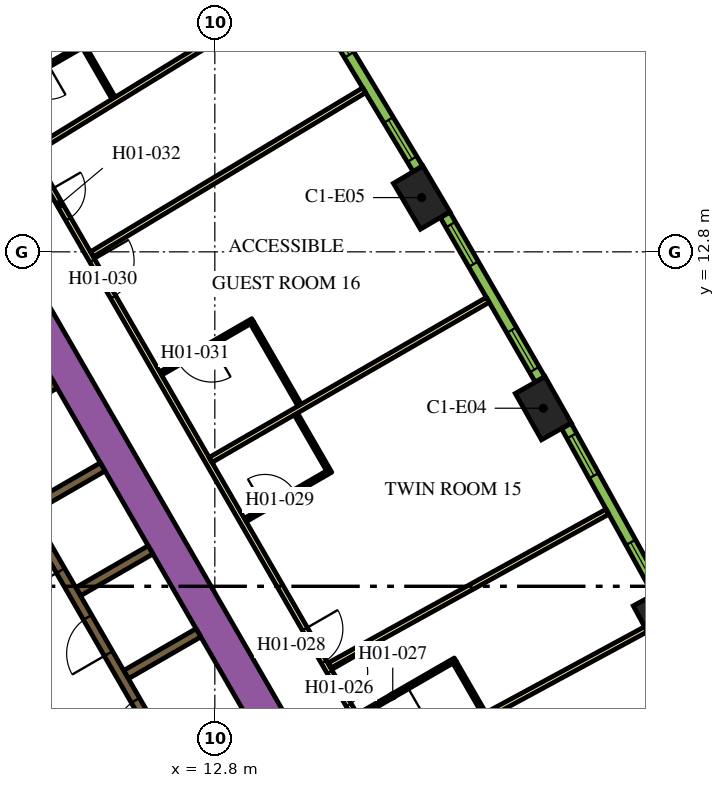
"""IFC4 building model, lengths in metres.
Left out: names, types, materials, properties, quantities, classifications, styles, units other than length and angle.
Written with IfcOpenShell. Run it as: python <this file> out.ifc"""

import sys

from ifc_helpers import new_model, si_unit, direction, frame, frame_2d, origin, origin_2d, place, context, subcontext, project, spatial, rectangle, extrude, element, fill, save


model = new_model("IFC4")
c1 = context("Model", 3, precision=1e-05, world=origin(), true_north=direction((0.0, 1.0)))
c2 = subcontext(c1, "Body", "Model", "MODEL_VIEW")
j1 = project(units=[si_unit("LENGTHUNIT", "METRE"), si_unit("PLANEANGLEUNIT", "RADIAN")], contexts=[c1])
p1 = place(None, origin())
s1 = spatial("IfcSite", under=j1, at=p1, CompositionType="ELEMENT")
p2 = place(p1, origin())
s2 = spatial("IfcBuilding", under=s1, at=p2, CompositionType="ELEMENT")
p3 = place(p2, frame((0.0, 0.0, 35.4)))
s3 = spatial("IfcBuildingStorey", under=s2, at=p3, CompositionType="ELEMENT", Elevation=35.4)
for number, where, z_axis, x_axis in (
    (1, (24.54, 3.085, 0.0), (0.0, 0.0, 1.0), (-0.476, 0.88, 0.0)),
    (2, (21.443, 8.685, 0.0), (0.0, 0.0, 1.0), (-0.492, 0.871, 0.0)),
    (3, (18.243, 14.228, 0.0), (0.0, 0.0, 1.0), (-0.508, 0.861, 0.0)),
):
    element("IfcColumn", number, at=place(p3, frame(where, z_axis=z_axis, x_axis=x_axis)), inside=s3, PredefinedType="COLUMN", context=c2, shape_type="SweptSolid", body=[
        extrude(rectangle(XDim=1.4, YDim=0.9, at=origin_2d()), origin(), (0.0, 0.0, 1.0), 3.9),
    ])
p4 = place(p3, frame((6.711, 13.476, 0.0), z_axis=(0.0, 0.0, 1.0), x_axis=(0.500002723396, -0.866023831425, 0.0)))
e4 = element("IfcWall", 4, at=p4, inside=s3, PredefinedType="SOLIDWALL", context=c2, shape_type="SweptSolid", body=[
    extrude(rectangle(XDim=20.334, YDim=0.9, at=frame_2d((10.167, 0.0))), origin(), (0.0, 0.0, 1.0), 3.9),
])
for number, where, z_axis, x_axis in (
    (5, (10.464, 1.677, 0.0), (0.0, 0.0, 1.0), (0.866, 0.5, 0.0)),
    (6, (6.684, 8.224, 0.0), (0.0, 0.0, 1.0), (0.866, 0.5, 0.0)),
    (7, (7.944, 6.041, 0.0), (0.0, 0.0, 1.0), (0.866, 0.5, 0.0)),
    (8, (9.204, 3.859, 0.0), (0.0, 0.0, 1.0), (0.866, 0.5, 0.0)),
):
    element("IfcWall", number, at=place(p3, frame(where, z_axis=z_axis, x_axis=x_axis)), inside=s3, PredefinedType="SOLIDWALL", context=c2, shape_type="SweptSolid", body=[
        extrude(rectangle(XDim=2.2, YDim=0.25, at=frame_2d((1.1, 0.0))), origin(), (0.0, 0.0, 1.0), 3.9),
    ])
p5 = place(p3, frame((11.553, -0.46, 0.0), z_axis=(0.0, 0.0, 1.0), x_axis=(-0.500006514828, 0.866021642414, 0.0)))
e9 = element("IfcWall", 9, at=p5, inside=s3, PredefinedType="SOLIDWALL", context=c2, shape_type="SweptSolid", body=[
    extrude(rectangle(XDim=12.35, YDim=0.25, at=frame_2d((6.175, 0.0))), origin(), (0.0, 0.0, 1.0), 3.9),
])
p6 = place(p5, frame((0.585, 0.0, 0.0)))
e10 = element("IfcOpeningElement", 10, at=p6, cuts=e9, PredefinedType="OPENING", context=c2, shape_type="SweptSolid", body=[
    extrude(rectangle(XDim=1.1, YDim=2.1, at=frame_2d((0.55, 1.05))), frame((0.0, 0.135, 0.0), z_axis=(0.0, -1.0, 0.0), x_axis=(1.0, 0.0, 0.0)), (0.0, 0.0, 1.0), 0.27),
])
p7 = place(p5, frame((3.105, 0.0, 0.0)))
e11 = element("IfcOpeningElement", 11, at=p7, cuts=e9, PredefinedType="OPENING", context=c2, shape_type="SweptSolid", body=[
    extrude(rectangle(XDim=1.1, YDim=2.1, at=frame_2d((0.55, 1.05))), frame((0.0, 0.135, 0.0), z_axis=(0.0, -1.0, 0.0), x_axis=(1.0, 0.0, 0.0)), (0.0, 0.0, 1.0), 0.27),
])
p8 = place(p5, frame((5.625, 0.0, 0.0)))
e12 = element("IfcOpeningElement", 12, at=p8, cuts=e9, PredefinedType="OPENING", context=c2, shape_type="SweptSolid", body=[
    extrude(rectangle(XDim=1.1, YDim=2.1, at=frame_2d((0.55, 1.05))), frame((0.0, 0.135, 0.0), z_axis=(0.0, -1.0, 0.0), x_axis=(1.0, 0.0, 0.0)), (0.0, 0.0, 1.0), 0.27),
])
p9 = place(p3, frame((8.565, -2.185, 0.0), z_axis=(0.0, 0.0, 1.0), x_axis=(-0.499997954832, 0.866026584559, 0.0)))
e13 = element("IfcWall", 13, at=p9, inside=s3, PredefinedType="SOLIDWALL", context=c2, shape_type="SweptSolid", body=[
    extrude(rectangle(XDim=12.35, YDim=0.25, at=frame_2d((6.175, 0.0))), origin(), (0.0, 0.0, 1.0), 3.9),
])
p10 = place(p9, frame((5.725, 0.0, 0.0)))
e14 = element("IfcOpeningElement", 14, at=p10, cuts=e13, PredefinedType="OPENING", context=c2, shape_type="SweptSolid", body=[
    extrude(rectangle(XDim=0.9, YDim=2.1, at=frame_2d((0.45, 1.05))), frame((0.0, 0.135, 0.0), z_axis=(0.0, -1.0, 0.0), x_axis=(1.0, 0.0, 0.0)), (0.0, 0.0, 1.0), 0.27),
])
p11 = place(p3, frame((6.163, 18.475, 0.0), z_axis=(0.0, 0.0, 1.0), x_axis=(0.500001317485, -0.866024643133, 0.0)))
e15 = element("IfcWall", 15, at=p11, inside=s3, PredefinedType="PARTITIONING", context=c2, shape_type="SweptSolid", body=[
    extrude(rectangle(XDim=25.767, YDim=0.15, at=frame_2d((12.883, 0.0))), origin(), (0.0, 0.0, 1.0), 2.75),
])
p12 = place(p11, frame((24.586, 0.0, 0.0)))
e16 = element("IfcOpeningElement", 16, at=p12, cuts=e15, PredefinedType="OPENING", context=c2, shape_type="SweptSolid", body=[
    extrude(rectangle(XDim=1.0, YDim=2.1, at=frame_2d((0.5, 1.05))), frame((0.0, 0.085, 0.0), z_axis=(0.0, -1.0, 0.0), x_axis=(1.0, 0.0, 0.0)), (0.0, 0.0, 1.0), 0.17),
])
p13 = place(p11, frame((19.319, 0.0, 0.0)))
e17 = element("IfcOpeningElement", 17, at=p13, cuts=e15, PredefinedType="OPENING", context=c2, shape_type="SweptSolid", body=[
    extrude(rectangle(XDim=1.0, YDim=2.1, at=frame_2d((0.5, 1.05))), frame((0.0, 0.085, 0.0), z_axis=(0.0, -1.0, 0.0), x_axis=(1.0, 0.0, 0.0)), (0.0, 0.0, 1.0), 0.17),
])
p14 = place(p11, frame((18.012, 0.0, 0.0)))
e18 = element("IfcOpeningElement", 18, at=p14, cuts=e15, PredefinedType="OPENING", context=c2, shape_type="SweptSolid", body=[
    extrude(rectangle(XDim=1.0, YDim=2.1, at=frame_2d((0.5, 1.05))), frame((0.0, 0.085, 0.0), z_axis=(0.0, -1.0, 0.0), x_axis=(1.0, 0.0, 0.0)), (0.0, 0.0, 1.0), 0.17),
])
p15 = place(p11, frame((6.824, 0.0, 0.0)))
e19 = element("IfcOpeningElement", 19, at=p15, cuts=e15, PredefinedType="OPENING", context=c2, shape_type="SweptSolid", body=[
    extrude(rectangle(XDim=1.1, YDim=2.1, at=frame_2d((0.55, 1.05))), frame((0.0, 0.085, 0.0), z_axis=(0.0, -1.0, 0.0), x_axis=(1.0, 0.0, 0.0)), (0.0, 0.0, 1.0), 0.17),
])
p16 = place(p11, frame((4.658, 0.0, 0.0)))
e20 = element("IfcOpeningElement", 20, at=p16, cuts=e15, PredefinedType="OPENING", context=c2, shape_type="SweptSolid", body=[
    extrude(rectangle(XDim=0.9, YDim=2.1, at=frame_2d((0.45, 1.05))), frame((0.0, 0.085, 0.0), z_axis=(0.0, -1.0, 0.0), x_axis=(1.0, 0.0, 0.0)), (0.0, 0.0, 1.0), 0.17),
])
p17 = place(p11, frame((0.18, 0.0, 0.0)))
e21 = element("IfcOpeningElement", 21, at=p17, cuts=e15, PredefinedType="OPENING", context=c2, shape_type="SweptSolid", body=[
    extrude(rectangle(XDim=1.0, YDim=2.1, at=frame_2d((0.5, 1.05))), frame((0.0, 0.085, 0.0), z_axis=(0.0, -1.0, 0.0), x_axis=(1.0, 0.0, 0.0)), (0.0, 0.0, 1.0), 0.17),
])
p18 = place(p3, frame((14.558, 19.475, 0.0), z_axis=(0.0, 0.0, 1.0), x_axis=(-0.851829455142, -0.523819223925, 0.0)))
e22 = element("IfcWall", 22, at=p18, inside=s3, PredefinedType="PARTITIONING", context=c2, shape_type="SweptSolid", body=[
    extrude(rectangle(XDim=7.688, YDim=0.15, at=frame_2d((3.844, 0.0))), origin(), (0.0, 0.0, 1.0), 2.75),
])
p19 = place(p3, frame((16.729, 17.052, 0.0), z_axis=(0.0, 0.0, 1.0), x_axis=(-0.856630606266, -0.515930232113, 0.0)))
e23 = element("IfcWall", 23, at=p19, inside=s3, PredefinedType="PARTITIONING", context=c2, shape_type="SweptSolid", body=[
    extrude(rectangle(XDim=8.355, YDim=0.15, at=frame_2d((4.178, 0.0))), origin(), (0.0, 0.0, 1.0), 2.75),
])
p20 = place(p3, frame((19.982, 11.537, 0.0), z_axis=(0.0, 0.0, 1.0), x_axis=(-0.866020994654, -0.500007636761, 0.0)))
e24 = element("IfcWall", 24, at=p20, inside=s3, PredefinedType="PARTITIONING", context=c2, shape_type="SweptSolid", body=[
    extrude(rectangle(XDim=8.423, YDim=0.15, at=frame_2d((4.211, 0.0))), origin(), (0.0, 0.0, 1.0), 2.75),
])
p21 = place(p3, frame((23.132, 5.962, 0.0), z_axis=(0.0, 0.0, 1.0), x_axis=(-0.875121716713, -0.483902863121, 0.0)))
e25 = element("IfcWall", 25, at=p21, inside=s3, PredefinedType="PARTITIONING", context=c2, shape_type="SweptSolid", body=[
    extrude(rectangle(XDim=8.355, YDim=0.15, at=frame_2d((4.178, 0.0))), origin(), (0.0, 0.0, 1.0), 2.75),
])
p22 = place(p3, frame((24.145, 2.871, 0.0), z_axis=(0.0, 0.0, 1.0), x_axis=(-0.879551725039, -0.475803281809, 0.0)))
e26 = element("IfcWall", 26, at=p22, inside=s3, PredefinedType="PARTITIONING", context=c2, shape_type="SweptSolid", body=[
    extrude(rectangle(XDim=7.688, YDim=0.15, at=frame_2d((3.844, 0.0))), origin(), (0.0, 0.0, 1.0), 2.75),
])
p23 = place(p3, frame((19.127, 2.071, 0.0), z_axis=(0.0, 0.0, 1.0), x_axis=(-0.866003658127, -0.500037662692, 0.0)))
e27 = element("IfcWall", 27, at=p23, inside=s3, PredefinedType="PARTITIONING", context=c2, shape_type="SweptSolid", body=[
    extrude(rectangle(XDim=2.95, YDim=0.1, at=frame_2d((1.475, 0.0))), origin(), (0.0, 0.0, 1.0), 2.75),
])
p24 = place(p23, frame((1.45, 0.0, 0.0)))
e28 = element("IfcOpeningElement", 28, at=p24, cuts=e27, PredefinedType="OPENING", context=c2, shape_type="SweptSolid", body=[
    extrude(rectangle(XDim=0.9, YDim=2.1, at=frame_2d((0.45, 1.05))), frame((0.0, 0.06, 0.0), z_axis=(0.0, -1.0, 0.0), x_axis=(1.0, 0.0, 0.0)), (0.0, 0.0, 1.0), 0.12),
])
p25 = place(p3, frame((19.109, 2.002, 0.0), z_axis=(0.0, 0.0, 1.0), x_axis=(0.500086022567, -0.865975732936, 0.0)))
e29 = element("IfcWall", 29, at=p25, inside=s3, PredefinedType="PARTITIONING", context=c2, shape_type="SweptSolid", body=[
    extrude(rectangle(XDim=1.55, YDim=0.1, at=frame_2d((0.775, 0.0))), origin(), (0.0, 0.0, 1.0), 2.75),
])
p26 = place(p3, frame((13.6, 5.744, 0.0), z_axis=(0.0, 0.0, 1.0), x_axis=(0.866021400173, 0.500006934395, 0.0)))
e30 = element("IfcWall", 30, at=p26, inside=s3, PredefinedType="PARTITIONING", context=c2, shape_type="SweptSolid", body=[
    extrude(rectangle(XDim=2.6, YDim=0.1, at=frame_2d((1.3, 0.0))), origin(), (0.0, 0.0, 1.0), 2.75),
])
p27 = place(p26, frame((0.6, 0.0, 0.0)))
e31 = element("IfcOpeningElement", 31, at=p27, cuts=e30, PredefinedType="OPENING", context=c2, shape_type="SweptSolid", body=[
    extrude(rectangle(XDim=0.9, YDim=2.1, at=frame_2d((0.45, 1.05))), frame((0.0, 0.06, 0.0), z_axis=(0.0, -1.0, 0.0), x_axis=(1.0, 0.0, 0.0)), (0.0, 0.0, 1.0), 0.12),
])
p28 = place(p3, frame((15.779, 7.071, 0.0), z_axis=(0.0, 0.0, 1.0), x_axis=(-0.499976720371, 0.866038843867, 0.0)))
e32 = element("IfcWall", 32, at=p28, inside=s3, PredefinedType="PARTITIONING", context=c2, shape_type="SweptSolid", body=[
    extrude(rectangle(XDim=1.69, YDim=0.1, at=frame_2d((0.845, 0.0))), origin(), (0.0, 0.0, 1.0), 2.75),
])
p29 = place(p3, frame((13.799, 10.999, 0.0), z_axis=(0.0, 0.0, 1.0), x_axis=(-0.866034573852, -0.49998411664, 0.0)))
e33 = element("IfcWall", 33, at=p29, inside=s3, PredefinedType="PARTITIONING", context=c2, shape_type="SweptSolid", body=[
    extrude(rectangle(XDim=2.8, YDim=0.1, at=frame_2d((1.4, 0.0))), origin(), (0.0, 0.0, 1.0), 2.75),
])
p30 = place(p29, frame((1.25, 0.0, 0.0)))
e34 = element("IfcOpeningElement", 34, at=p30, cuts=e33, PredefinedType="OPENING", context=c2, shape_type="SweptSolid", body=[
    extrude(rectangle(XDim=1.0, YDim=2.1, at=frame_2d((0.5, 1.05))), frame((0.0, 0.06, 0.0), z_axis=(0.0, -1.0, 0.0), x_axis=(1.0, 0.0, 0.0)), (0.0, 0.0, 1.0), 0.12),
])
p31 = place(p3, frame((13.781, 10.931, 0.0), z_axis=(0.0, 0.0, 1.0), x_axis=(0.500004234368, -0.866022959057, 0.0)))
e35 = element("IfcWall", 35, at=p31, inside=s3, PredefinedType="PARTITIONING", context=c2, shape_type="SweptSolid", body=[
    extrude(rectangle(XDim=2.5, YDim=0.1, at=frame_2d((1.25, 0.0))), origin(), (0.0, 0.0, 1.0), 2.75),
])
p32 = place(p3, frame((9.375, 18.261, 0.0), z_axis=(0.0, 0.0, 1.0), x_axis=(-0.866021400173, -0.500006934395, 0.0)))
e36 = element("IfcWall", 36, at=p32, inside=s3, PredefinedType="PARTITIONING", context=c2, shape_type="SweptSolid", body=[
    extrude(rectangle(XDim=2.6, YDim=0.1, at=frame_2d((1.3, 0.0))), origin(), (0.0, 0.0, 1.0), 2.75),
])
p33 = place(p32, frame((1.1, 0.0, 0.0)))
e37 = element("IfcOpeningElement", 37, at=p33, cuts=e36, PredefinedType="OPENING", context=c2, shape_type="SweptSolid", body=[
    extrude(rectangle(XDim=0.9, YDim=2.1, at=frame_2d((0.45, 1.05))), frame((0.0, 0.06, 0.0), z_axis=(0.0, -1.0, 0.0), x_axis=(1.0, 0.0, 0.0)), (0.0, 0.0, 1.0), 0.12),
])
p34 = place(p3, frame((9.357, 18.193, 0.0), z_axis=(0.0, 0.0, 1.0), x_axis=(0.499899694197, -0.866083307622, 0.0)))
e38 = element("IfcWall", 38, at=p34, inside=s3, PredefinedType="PARTITIONING", context=c2, shape_type="SweptSolid", body=[
    extrude(rectangle(XDim=1.55, YDim=0.1, at=frame_2d((0.775, 0.0))), origin(), (0.0, 0.0, 1.0), 2.75),
])
p35 = place(p3, frame((24.468, 3.846, 0.0), z_axis=(0.0, 0.0, 1.0), x_axis=(-0.483912572871, 0.875116347589, 0.0)))
e39 = element("IfcWall", 39, at=p35, inside=s3, PredefinedType="SOLIDWALL", context=c2, shape_type="SweptSolid", body=[
    extrude(rectangle(XDim=4.998, YDim=0.29, at=frame_2d((2.499, 0.0))), origin(), (0.0, 0.0, 1.0), 3.65),
])
p36 = place(p35, frame((0.297, 0.0, 0.9)))
e40 = element("IfcOpeningElement", 40, at=p36, cuts=e39, PredefinedType="OPENING", context=c2, shape_type="SweptSolid", body=[
    extrude(rectangle(XDim=1.2, YDim=2.15, at=frame_2d((0.6, 1.075))), frame((0.0, 0.155, 0.0), z_axis=(0.0, -1.0, 0.0), x_axis=(1.0, 0.0, 0.0)), (0.0, 0.0, 1.0), 0.31),
])
p37 = place(p35, frame((3.501, 0.0, 0.9)))
e41 = element("IfcOpeningElement", 41, at=p37, cuts=e39, PredefinedType="OPENING", context=c2, shape_type="SweptSolid", body=[
    extrude(rectangle(XDim=1.2, YDim=2.15, at=frame_2d((0.6, 1.075))), frame((0.0, 0.155, 0.0), z_axis=(0.0, -1.0, 0.0), x_axis=(1.0, 0.0, 0.0)), (0.0, 0.0, 1.0), 0.31),
])
p38 = place(p3, frame((21.357, 9.445, 0.0), z_axis=(0.0, 0.0, 1.0), x_axis=(-0.50002123722, 0.866013142123, 0.0)))
e42 = element("IfcWall", 42, at=p38, inside=s3, PredefinedType="SOLIDWALL", context=c2, shape_type="SweptSolid", body=[
    extrude(rectangle(XDim=4.998, YDim=0.29, at=frame_2d((2.499, 0.0))), origin(), (0.0, 0.0, 1.0), 3.65),
])
p39 = place(p38, frame((0.297, 0.0, 0.9)))
e43 = element("IfcOpeningElement", 43, at=p39, cuts=e42, PredefinedType="OPENING", context=c2, shape_type="SweptSolid", body=[
    extrude(rectangle(XDim=1.2, YDim=2.15, at=frame_2d((0.6, 1.075))), frame((0.0, 0.155, 0.0), z_axis=(0.0, -1.0, 0.0), x_axis=(1.0, 0.0, 0.0)), (0.0, 0.0, 1.0), 0.31),
])
p40 = place(p38, frame((3.501, 0.0, 0.9)))
e44 = element("IfcOpeningElement", 44, at=p40, cuts=e42, PredefinedType="OPENING", context=c2, shape_type="SweptSolid", body=[
    extrude(rectangle(XDim=1.2, YDim=2.15, at=frame_2d((0.6, 1.075))), frame((0.0, 0.155, 0.0), z_axis=(0.0, -1.0, 0.0), x_axis=(1.0, 0.0, 0.0)), (0.0, 0.0, 1.0), 0.31),
])
p41 = place(p3, frame((18.143, 14.986, 0.0), z_axis=(0.0, 0.0, 1.0), x_axis=(-0.515938796285, 0.856625448191, 0.0)))
e45 = element("IfcWall", 45, at=p41, inside=s3, PredefinedType="SOLIDWALL", context=c2, shape_type="SweptSolid", body=[
    extrude(rectangle(XDim=4.998, YDim=0.29, at=frame_2d((2.499, 0.0))), origin(), (0.0, 0.0, 1.0), 3.65),
])
p42 = place(p41, frame((0.297, 0.0, 0.9)))
e46 = element("IfcOpeningElement", 46, at=p42, cuts=e45, PredefinedType="OPENING", context=c2, shape_type="SweptSolid", body=[
    extrude(rectangle(XDim=1.2, YDim=2.15, at=frame_2d((0.6, 1.075))), frame((0.0, 0.155, 0.0), z_axis=(0.0, -1.0, 0.0), x_axis=(1.0, 0.0, 0.0)), (0.0, 0.0, 1.0), 0.31),
])
p43 = place(p41, frame((3.501, 0.0, 0.9)))
e47 = element("IfcOpeningElement", 47, at=p43, cuts=e45, PredefinedType="OPENING", context=c2, shape_type="SweptSolid", body=[
    extrude(rectangle(XDim=1.2, YDim=2.15, at=frame_2d((0.6, 1.075))), frame((0.0, 0.155, 0.0), z_axis=(0.0, -1.0, 0.0), x_axis=(1.0, 0.0, 0.0)), (0.0, 0.0, 1.0), 0.31),
])
p44 = place(p6, origin())
e48 = element("IfcDoor", 48, at=p44, inside=s3, OperationType="DOUBLE_DOOR_SLIDING", PredefinedType="DOOR", context=c2, shape_type="SweptSolid", body=[
    extrude(rectangle(XDim=1.1, YDim=2.1, at=frame_2d((0.55, 1.05))), frame((0.0, 0.025, 0.0), z_axis=(0.0, -1.0, 0.0), x_axis=(1.0, 0.0, 0.0)), (0.0, 0.0, 1.0), 0.05),
])
fill(e10, e48)
p45 = place(p7, origin())
e49 = element("IfcDoor", 49, at=p45, inside=s3, OperationType="DOUBLE_DOOR_SLIDING", PredefinedType="DOOR", context=c2, shape_type="SweptSolid", body=[
    extrude(rectangle(XDim=1.1, YDim=2.1, at=frame_2d((0.55, 1.05))), frame((0.0, 0.025, 0.0), z_axis=(0.0, -1.0, 0.0), x_axis=(1.0, 0.0, 0.0)), (0.0, 0.0, 1.0), 0.05),
])
fill(e11, e49)
p46 = place(p8, origin())
e50 = element("IfcDoor", 50, at=p46, inside=s3, OperationType="DOUBLE_DOOR_SLIDING", PredefinedType="DOOR", context=c2, shape_type="SweptSolid", body=[
    extrude(rectangle(XDim=1.1, YDim=2.1, at=frame_2d((0.55, 1.05))), frame((0.0, 0.025, 0.0), z_axis=(0.0, -1.0, 0.0), x_axis=(1.0, 0.0, 0.0)), (0.0, 0.0, 1.0), 0.05),
])
fill(e12, e50)
p47 = place(p13, origin())
e51 = element("IfcDoor", 51, at=p47, inside=s3, OperationType="SINGLE_SWING_LEFT", PredefinedType="DOOR", context=c2, shape_type="SweptSolid", body=[
    extrude(rectangle(XDim=1.0, YDim=2.1, at=frame_2d((0.5, 1.05))), frame((0.0, 0.025, 0.0), z_axis=(0.0, -1.0, 0.0), x_axis=(1.0, 0.0, 0.0)), (0.0, 0.0, 1.0), 0.05),
])
fill(e17, e51)
p48 = place(p24, origin())
e52 = element("IfcDoor", 52, at=p48, inside=s3, OperationType="SINGLE_SWING_LEFT", PredefinedType="DOOR", context=c2, shape_type="SweptSolid", body=[
    extrude(rectangle(XDim=0.9, YDim=2.1, at=frame_2d((0.45, 1.05))), frame((0.0, 0.025, 0.0), z_axis=(0.0, -1.0, 0.0), x_axis=(1.0, 0.0, 0.0)), (0.0, 0.0, 1.0), 0.05),
])
fill(e28, e52)
p49 = place(p14, origin())
e53 = element("IfcDoor", 53, at=p49, inside=s3, OperationType="SINGLE_SWING_RIGHT", PredefinedType="DOOR", context=c2, shape_type="SweptSolid", body=[
    extrude(rectangle(XDim=1.0, YDim=2.1, at=frame_2d((0.5, 1.05))), frame((0.0, 0.025, 0.0), z_axis=(0.0, -1.0, 0.0), x_axis=(1.0, 0.0, 0.0)), (0.0, 0.0, 1.0), 0.05),
])
fill(e18, e53)
p50 = place(p27, origin())
e54 = element("IfcDoor", 54, at=p50, inside=s3, OperationType="SINGLE_SWING_RIGHT", PredefinedType="DOOR", context=c2, shape_type="SweptSolid", body=[
    extrude(rectangle(XDim=0.9, YDim=2.1, at=frame_2d((0.45, 1.05))), frame((0.0, 0.025, 0.0), z_axis=(0.0, -1.0, 0.0), x_axis=(1.0, 0.0, 0.0)), (0.0, 0.0, 1.0), 0.05),
])
fill(e31, e54)
p51 = place(p15, origin())
e55 = element("IfcDoor", 55, at=p51, inside=s3, OperationType="SINGLE_SWING_LEFT", PredefinedType="DOOR", context=c2, shape_type="SweptSolid", body=[
    extrude(rectangle(XDim=1.1, YDim=2.1, at=frame_2d((0.55, 1.05))), frame((0.0, 0.025, 0.0), z_axis=(0.0, -1.0, 0.0), x_axis=(1.0, 0.0, 0.0)), (0.0, 0.0, 1.0), 0.05),
])
fill(e19, e55)
p52 = place(p30, origin())
e56 = element("IfcDoor", 56, at=p52, inside=s3, OperationType="SINGLE_SWING_LEFT", PredefinedType="DOOR", context=c2, shape_type="SweptSolid", body=[
    extrude(rectangle(XDim=1.0, YDim=2.1, at=frame_2d((0.5, 1.05))), frame((0.0, 0.025, 0.0), z_axis=(0.0, -1.0, 0.0), x_axis=(1.0, 0.0, 0.0)), (0.0, 0.0, 1.0), 0.05),
])
fill(e34, e56)
p53 = place(p16, origin())
e57 = element("IfcDoor", 57, at=p53, inside=s3, OperationType="SINGLE_SWING_LEFT", PredefinedType="DOOR", context=c2, shape_type="SweptSolid", body=[
    extrude(rectangle(XDim=0.9, YDim=2.1, at=frame_2d((0.45, 1.05))), frame((0.0, 0.025, 0.0), z_axis=(0.0, -1.0, 0.0), x_axis=(1.0, 0.0, 0.0)), (0.0, 0.0, 1.0), 0.05),
])
fill(e20, e57)
p54 = place(p36, origin())
e58 = element("IfcWindow", 58, at=p54, inside=s3, PartitioningType="DOUBLE_PANEL_VERTICAL", PredefinedType="WINDOW", context=c2, shape_type="SweptSolid", body=[
    extrude(rectangle(XDim=1.2, YDim=2.15, at=frame_2d((0.6, 1.075))), frame((0.0, 0.015, 0.0), z_axis=(0.0, -1.0, 0.0), x_axis=(1.0, 0.0, 0.0)), (0.0, 0.0, 1.0), 0.06),
])
fill(e40, e58)
p55 = place(p37, origin())
e59 = element("IfcWindow", 59, at=p55, inside=s3, PartitioningType="DOUBLE_PANEL_VERTICAL", PredefinedType="WINDOW", context=c2, shape_type="SweptSolid", body=[
    extrude(rectangle(XDim=1.2, YDim=2.15, at=frame_2d((0.6, 1.075))), frame((0.0, 0.015, 0.0), z_axis=(0.0, -1.0, 0.0), x_axis=(1.0, 0.0, 0.0)), (0.0, 0.0, 1.0), 0.06),
])
fill(e41, e59)
p56 = place(p39, origin())
e60 = element("IfcWindow", 60, at=p56, inside=s3, PartitioningType="DOUBLE_PANEL_VERTICAL", PredefinedType="WINDOW", context=c2, shape_type="SweptSolid", body=[
    extrude(rectangle(XDim=1.2, YDim=2.15, at=frame_2d((0.6, 1.075))), frame((0.0, 0.015, 0.0), z_axis=(0.0, -1.0, 0.0), x_axis=(1.0, 0.0, 0.0)), (0.0, 0.0, 1.0), 0.06),
])
fill(e43, e60)
p57 = place(p40, origin())
e61 = element("IfcWindow", 61, at=p57, inside=s3, PartitioningType="DOUBLE_PANEL_VERTICAL", PredefinedType="WINDOW", context=c2, shape_type="SweptSolid", body=[
    extrude(rectangle(XDim=1.2, YDim=2.15, at=frame_2d((0.6, 1.075))), frame((0.0, 0.015, 0.0), z_axis=(0.0, -1.0, 0.0), x_axis=(1.0, 0.0, 0.0)), (0.0, 0.0, 1.0), 0.06),
])
fill(e44, e61)
p58 = place(p42, origin())
e62 = element("IfcWindow", 62, at=p58, inside=s3, PartitioningType="DOUBLE_PANEL_VERTICAL", PredefinedType="WINDOW", context=c2, shape_type="SweptSolid", body=[
    extrude(rectangle(XDim=1.2, YDim=2.15, at=frame_2d((0.6, 1.075))), frame((0.0, 0.015, 0.0), z_axis=(0.0, -1.0, 0.0), x_axis=(1.0, 0.0, 0.0)), (0.0, 0.0, 1.0), 0.06),
])
fill(e46, e62)
p59 = place(p43, origin())
e63 = element("IfcWindow", 63, at=p59, inside=s3, PartitioningType="DOUBLE_PANEL_VERTICAL", PredefinedType="WINDOW", context=c2, shape_type="SweptSolid", body=[
    extrude(rectangle(XDim=1.2, YDim=2.15, at=frame_2d((0.6, 1.075))), frame((0.0, 0.015, 0.0), z_axis=(0.0, -1.0, 0.0), x_axis=(1.0, 0.0, 0.0)), (0.0, 0.0, 1.0), 0.06),
])
fill(e47, e63)
save(model, sys.argv[1])
